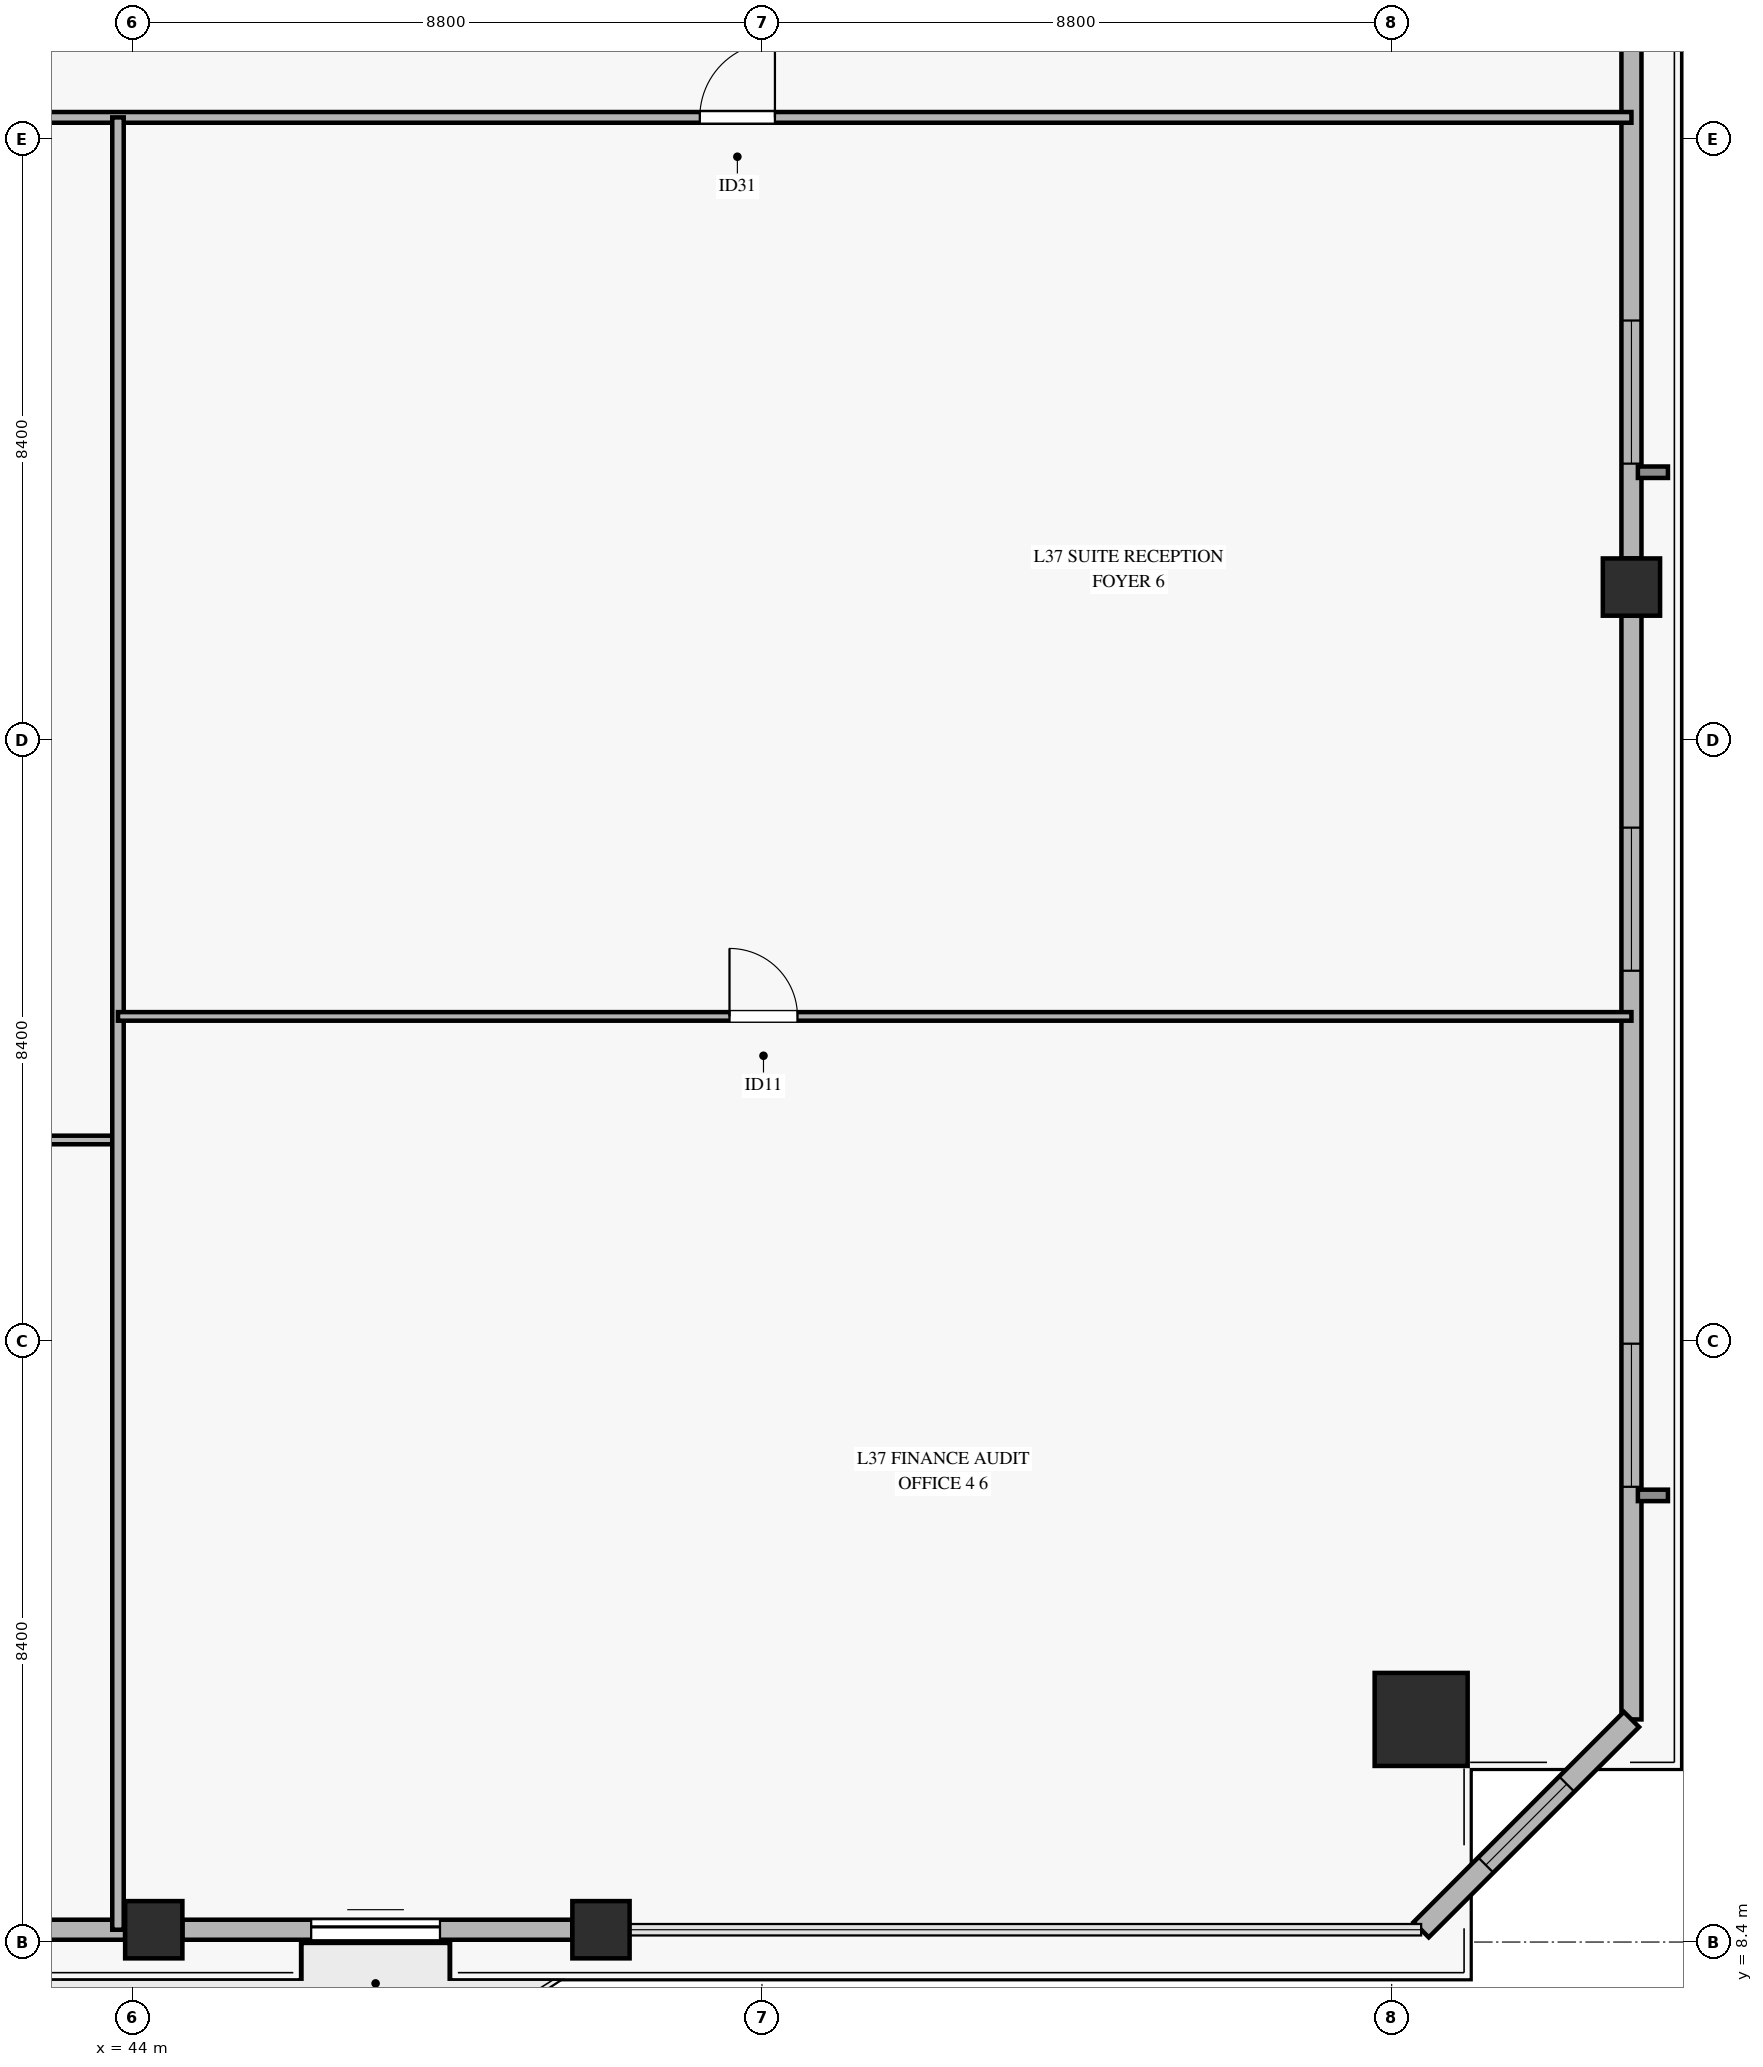
"""IFC4 building model, lengths in metres.
Left out: names, types, materials, properties, quantities, classifications, styles, units other than length and angle.
Written with IfcOpenShell. Run it as: python <this file> out.ifc"""

import sys

from ifc_helpers import new_model, si_unit, direction, frame, frame_2d, origin, origin_2d, place, context, subcontext, project, spatial, rectangle, hollow_rectangle, extrude, source, transform, mapped, element, fill, save


model = new_model("IFC4")
c1 = context("Model", 3, precision=1e-05, world=origin(), true_north=direction((0.0, 1.0)))
c2 = subcontext(c1, "Body", "Model", "MODEL_VIEW")
j1 = project(units=[si_unit("LENGTHUNIT", "METRE"), si_unit("PLANEANGLEUNIT", "RADIAN")], contexts=[c1])
p1 = place(None, origin())
s1 = spatial("IfcSite", under=j1, at=p1, CompositionType="ELEMENT")
p2 = place(p1, origin())
s2 = spatial("IfcBuilding", under=s1, at=p2, CompositionType="ELEMENT")
p3 = place(p2, frame((0.0, 0.0, 152.7)))
s3 = spatial("IfcBuildingStorey", under=s2, at=p3, CompositionType="ELEMENT", Elevation=152.7)
m1 = source(origin(), c2, "Body", "SweptSolid", [
    extrude(hollow_rectangle(XDim=1.3, YDim=1.3, WallThickness=0.06, at=origin_2d()), origin(), (0.0, 0.0, 1.0), 3.27),
])
p4 = place(p3, frame((62.012, 11.511, 0.0), z_axis=(0.0, 0.0, 1.0), x_axis=(1.0, 0.0, 0.0)))
e1 = element("IfcColumn", 1, at=p4, inside=s3, PredefinedType="COLUMN", context=c2, shape_type="MappedRepresentation", body=[
    mapped(m1, transform((0.0, 0.0, 0.0), x_axis=(1.0, 0.0, 0.0), y_axis=(0.0, 1.0, 0.0), z_axis=(0.0, 0.0, 1.0), scale=1.0)),
])
m2 = source(origin(), c2, "Body", "SweptSolid", [
    extrude(hollow_rectangle(XDim=0.8, YDim=0.8, WallThickness=0.036, at=origin_2d()), origin(), (0.0, 0.0, 1.0), 3.27),
])
for number, where, z_axis, x_axis in (
    (2, (44.3, 8.572, 0.0), (0.0, 0.0, 1.0), (1.0, 0.0, 0.0)),
    (3, (50.55, 8.572, 0.0), (0.0, 0.0, 1.0), (1.0, 0.0, 0.0)),
    (4, (64.951, 27.336, 0.0), (0.0, 0.0, 1.0), (1.0, 0.0, 0.0)),
):
    element("IfcColumn", number, at=place(p3, frame(where, z_axis=z_axis, x_axis=x_axis)), inside=s3, PredefinedType="COLUMN", context=c2, shape_type="MappedRepresentation", body=[
        mapped(m2, transform((0.0, 0.0, 0.0), x_axis=(1.0, 0.0, 0.0), y_axis=(0.0, 1.0, 0.0), z_axis=(0.0, 0.0, 1.0), scale=1.0)),
    ])
p5 = place(p3, frame((37.95, 8.572, 0.0), z_axis=(0.0, 0.0, 1.0), x_axis=(1.0, 0.0, 0.0)))
e5 = element("IfcWall", 5, at=p5, inside=s3, PredefinedType="SOLIDWALL", context=c2, shape_type="SweptSolid", body=[
    extrude(rectangle(XDim=5.95, YDim=0.28, at=frame_2d((2.975, 0.0))), origin(), (0.0, 0.0, 1.0), 2.75),
])
p6 = place(p3, frame((44.7, 8.572, 0.0), z_axis=(0.0, 0.0, 1.0), x_axis=(1.0, 0.0, 0.0)))
e6 = element("IfcWall", 6, at=p6, inside=s3, PredefinedType="SOLIDWALL", context=c2, shape_type="SweptSolid", body=[
    extrude(rectangle(XDim=5.45, YDim=0.28, at=frame_2d((2.725, 0.0))), origin(), (0.0, 0.0, 1.0), 2.75),
])
p7 = place(p6, frame((1.8, 0.0, 0.0)))
e7 = element("IfcOpeningElement", 7, at=p7, cuts=e6, PredefinedType="OPENING", context=c2, shape_type="SweptSolid", body=[
    extrude(rectangle(XDim=1.8, YDim=2.25, at=frame_2d((0.9, 1.125))), frame((0.0, 0.15, 0.0), z_axis=(0.0, -1.0, 0.0), x_axis=(1.0, 0.0, 0.0)), (0.0, 0.0, 1.0), 0.3),
])
p8 = place(p3, frame((64.951, 11.511, 0.0), z_axis=(0.0, 0.0, 1.0), x_axis=(0.0, 1.0, 0.0)))
e8 = element("IfcWall", 8, at=p8, inside=s3, PredefinedType="SOLIDWALL", context=c2, shape_type="SweptSolid", body=[
    extrude(rectangle(XDim=15.425, YDim=0.28, at=frame_2d((7.712, 0.0))), origin(), (0.0, 0.0, 1.0), 2.75),
])
p9 = place(p8, frame((3.251, 0.0, 0.45)))
e9 = element("IfcOpeningElement", 9, at=p9, cuts=e8, PredefinedType="OPENING", context=c2, shape_type="SweptSolid", body=[
    extrude(rectangle(XDim=2.0, YDim=2.0, at=frame_2d((1.0, 1.0))), frame((0.0, 0.15, 0.0), z_axis=(0.0, -1.0, 0.0), x_axis=(1.0, 0.0, 0.0)), (0.0, 0.0, 1.0), 0.3),
])
p10 = place(p8, frame((10.463, 0.0, 0.45)))
e10 = element("IfcOpeningElement", 10, at=p10, cuts=e8, PredefinedType="OPENING", context=c2, shape_type="SweptSolid", body=[
    extrude(rectangle(XDim=2.0, YDim=2.0, at=frame_2d((1.0, 1.0))), frame((0.0, 0.15, 0.0), z_axis=(0.0, -1.0, 0.0), x_axis=(1.0, 0.0, 0.0)), (0.0, 0.0, 1.0), 0.3),
])
p11 = place(p3, frame((64.951, 27.736, 0.0), z_axis=(0.0, 0.0, 1.0), x_axis=(0.0, 1.0, 0.0)))
e11 = element("IfcWall", 11, at=p11, inside=s3, PredefinedType="SOLIDWALL", context=c2, shape_type="SweptSolid", body=[
    extrude(rectangle(XDim=15.425, YDim=0.28, at=frame_2d((7.712, 0.0))), origin(), (0.0, 0.0, 1.0), 2.75),
])
p12 = place(p11, frame((1.325, 0.0, 0.45)))
e12 = element("IfcOpeningElement", 12, at=p12, cuts=e11, PredefinedType="OPENING", context=c2, shape_type="SweptSolid", body=[
    extrude(rectangle(XDim=2.0, YDim=2.0, at=frame_2d((1.0, 1.0))), frame((0.0, 0.15, 0.0), z_axis=(0.0, -1.0, 0.0), x_axis=(1.0, 0.0, 0.0)), (0.0, 0.0, 1.0), 0.3),
])
p13 = place(p11, frame((12.031, 0.0, 0.45)))
e13 = element("IfcOpeningElement", 13, at=p13, cuts=e11, PredefinedType="OPENING", context=c2, shape_type="SweptSolid", body=[
    extrude(rectangle(XDim=2.0, YDim=2.0, at=frame_2d((1.0, 1.0))), frame((0.0, 0.15, 0.0), z_axis=(0.0, -1.0, 0.0), x_axis=(1.0, 0.0, 0.0)), (0.0, 0.0, 1.0), 0.3),
])
p14 = place(p3, frame((62.012, 8.572, 0.0), z_axis=(0.0, 0.0, 1.0), x_axis=(0.707106781187, 0.707106781187, 0.0)))
e14 = element("IfcWall", 14, at=p14, inside=s3, PredefinedType="SOLIDWALL", context=c2, shape_type="SweptSolid", body=[
    extrude(rectangle(XDim=4.156, YDim=0.3, at=frame_2d((2.078, 0.0))), origin(), (0.0, 0.0, 1.0), 2.75),
])
p15 = place(p14, frame((1.278, 0.0, 0.45)))
e15 = element("IfcOpeningElement", 15, at=p15, cuts=e14, PredefinedType="OPENING", context=c2, shape_type="SweptSolid", body=[
    extrude(rectangle(XDim=1.6, YDim=2.0, at=frame_2d((0.8, 1.0))), frame((0.0, 0.16, 0.0), z_axis=(0.0, -1.0, 0.0), x_axis=(1.0, 0.0, 0.0)), (0.0, 0.0, 1.0), 0.32),
])
p16 = place(p3, frame((5.449, 33.9, 0.0), z_axis=(0.0, 0.0, 1.0), x_axis=(1.0, 0.0, 0.0)))
e16 = element("IfcWall", 16, at=p16, inside=s3, PredefinedType="PARTITIONING", context=c2, shape_type="SweptSolid", body=[
    extrude(rectangle(XDim=59.502, YDim=0.15, at=frame_2d((29.751, 0.0))), origin(), (0.0, 0.0, 1.0), 2.455),
])
p17 = place(p16, frame((6.355, 0.0, 0.0)))
e17 = element("IfcOpeningElement", 17, at=p17, cuts=e16, PredefinedType="OPENING", context=c2, shape_type="SweptSolid", body=[
    extrude(rectangle(XDim=1.05, YDim=2.15, at=frame_2d((0.525, 1.075))), frame((0.0, 0.085, 0.0), z_axis=(0.0, -1.0, 0.0), x_axis=(1.0, 0.0, 0.0)), (0.0, 0.0, 1.0), 0.17),
])
p18 = place(p16, frame((18.704, 0.0, 0.0)))
e18 = element("IfcOpeningElement", 18, at=p18, cuts=e16, PredefinedType="OPENING", context=c2, shape_type="SweptSolid", body=[
    extrude(rectangle(XDim=1.05, YDim=2.15, at=frame_2d((0.525, 1.075))), frame((0.0, 0.085, 0.0), z_axis=(0.0, -1.0, 0.0), x_axis=(1.0, 0.0, 0.0)), (0.0, 0.0, 1.0), 0.17),
])
p19 = place(p16, frame((24.896, 0.0, 0.0)))
e19 = element("IfcOpeningElement", 19, at=p19, cuts=e16, PredefinedType="OPENING", context=c2, shape_type="SweptSolid", body=[
    extrude(rectangle(XDim=1.05, YDim=2.15, at=frame_2d((0.525, 1.075))), frame((0.0, 0.085, 0.0), z_axis=(0.0, -1.0, 0.0), x_axis=(1.0, 0.0, 0.0)), (0.0, 0.0, 1.0), 0.17),
])
p20 = place(p16, frame((30.387, 0.0, 0.0)))
e20 = element("IfcOpeningElement", 20, at=p20, cuts=e16, PredefinedType="OPENING", context=c2, shape_type="SweptSolid", body=[
    extrude(rectangle(XDim=1.05, YDim=2.15, at=frame_2d((0.525, 1.075))), frame((0.0, 0.085, 0.0), z_axis=(0.0, -1.0, 0.0), x_axis=(1.0, 0.0, 0.0)), (0.0, 0.0, 1.0), 0.17),
])
p21 = place(p16, frame((35.587, 0.0, 0.0)))
e21 = element("IfcOpeningElement", 21, at=p21, cuts=e16, PredefinedType="OPENING", context=c2, shape_type="SweptSolid", body=[
    extrude(rectangle(XDim=1.05, YDim=2.15, at=frame_2d((0.525, 1.075))), frame((0.0, 0.085, 0.0), z_axis=(0.0, -1.0, 0.0), x_axis=(1.0, 0.0, 0.0)), (0.0, 0.0, 1.0), 0.17),
])
p22 = place(p16, frame((46.482, 0.0, 0.0)))
e22 = element("IfcOpeningElement", 22, at=p22, cuts=e16, PredefinedType="OPENING", context=c2, shape_type="SweptSolid", body=[
    extrude(rectangle(XDim=1.05, YDim=2.15, at=frame_2d((0.525, 1.075))), frame((0.0, 0.085, 0.0), z_axis=(0.0, -1.0, 0.0), x_axis=(1.0, 0.0, 0.0)), (0.0, 0.0, 1.0), 0.17),
])
p23 = place(p3, frame((38.6, 19.609, 0.0), z_axis=(0.0, 0.0, 1.0), x_axis=(1.0, 0.0, 0.0)))
e23 = element("IfcWall", 23, at=p23, inside=s3, PredefinedType="PARTITIONING", context=c2, shape_type="SweptSolid", body=[
    extrude(rectangle(XDim=5.2, YDim=0.12, at=frame_2d((2.6, 0.0))), origin(), (0.0, 0.0, 1.0), 3.27),
])
p24 = place(p23, frame((2.325, 0.0, 0.0)))
e24 = element("IfcOpeningElement", 24, at=p24, cuts=e23, PredefinedType="OPENING", context=c2, shape_type="SweptSolid", body=[
    extrude(rectangle(XDim=0.95, YDim=2.1, at=frame_2d((0.475, 1.05))), frame((0.0, 0.07, 0.0), z_axis=(0.0, -1.0, 0.0), x_axis=(1.0, 0.0, 0.0)), (0.0, 0.0, 1.0), 0.14),
])
p25 = place(p3, frame((43.8, 8.572, 0.0), z_axis=(0.0, 0.0, 1.0), x_axis=(0.0, 1.0, 0.0)))
e25 = element("IfcWall", 25, at=p25, inside=s3, PredefinedType="PARTITIONING", context=c2, shape_type="SweptSolid", body=[
    extrude(rectangle(XDim=25.328, YDim=0.16, at=frame_2d((12.664, 0.0))), origin(), (0.0, 0.0, 1.0), 2.755),
])
p26 = place(p3, frame((43.8, 21.336, 0.0), z_axis=(0.0, 0.0, 1.0), x_axis=(1.0, 0.0, 0.0)))
e26 = element("IfcWall", 26, at=p26, inside=s3, PredefinedType="PARTITIONING", context=c2, shape_type="SweptSolid", body=[
    extrude(rectangle(XDim=21.151, YDim=0.12, at=frame_2d((10.575, 0.0))), origin(), (0.0, 0.0, 1.0), 2.455),
])
p27 = place(p26, frame((8.546, 0.0, 0.0)))
e27 = element("IfcOpeningElement", 27, at=p27, cuts=e26, PredefinedType="OPENING", context=c2, shape_type="SweptSolid", body=[
    extrude(rectangle(XDim=0.95, YDim=2.1, at=frame_2d((0.475, 1.05))), frame((0.0, 0.07, 0.0), z_axis=(0.0, -1.0, 0.0), x_axis=(1.0, 0.0, 0.0)), (0.0, 0.0, 1.0), 0.14),
])
m3 = source(origin(), c2, "Body", "SweptSolid", [
    extrude(rectangle(XDim=1.8, YDim=2.25, at=frame_2d((0.9, 1.125))), frame((0.0, 0.025, 0.0), z_axis=(0.0, -1.0, 0.0), x_axis=(1.0, 0.0, 0.0)), (0.0, 0.0, 1.0), 0.05),
])
p28 = place(p7, origin())
e28 = element("IfcDoor", 28, at=p28, inside=s3, OperationType="SLIDING_TO_LEFT", PredefinedType="DOOR", context=c2, shape_type="MappedRepresentation", body=[
    mapped(m3, transform((0.0, 0.0, 0.0), x_axis=(1.0, 0.0, 0.0), y_axis=(0.0, 1.0, 0.0), z_axis=(0.0, 0.0, 1.0), scale=1.0)),
])
fill(e7, e28)
m4 = source(origin(), c2, "Body", "SweptSolid", [
    extrude(rectangle(XDim=2.0, YDim=2.0, at=frame_2d((1.0, 1.0))), frame((0.0, 0.03, 0.0), z_axis=(0.0, -1.0, 0.0), x_axis=(1.0, 0.0, 0.0)), (0.0, 0.0, 1.0), 0.06),
])
p29 = place(p9, origin())
e29 = element("IfcWindow", 29, at=p29, inside=s3, PartitioningType="SINGLE_PANEL", PredefinedType="WINDOW", context=c2, shape_type="MappedRepresentation", body=[
    mapped(m4, transform((0.0, 0.0, 0.0), x_axis=(1.0, 0.0, 0.0), y_axis=(0.0, 1.0, 0.0), z_axis=(0.0, 0.0, 1.0), scale=1.0)),
])
fill(e9, e29)
p30 = place(p10, origin())
e30 = element("IfcWindow", 30, at=p30, inside=s3, PartitioningType="SINGLE_PANEL", PredefinedType="WINDOW", context=c2, shape_type="MappedRepresentation", body=[
    mapped(m4, transform((0.0, 0.0, 0.0), x_axis=(1.0, 0.0, 0.0), y_axis=(0.0, 1.0, 0.0), z_axis=(0.0, 0.0, 1.0), scale=1.0)),
])
fill(e10, e30)
p31 = place(p12, origin())
e31 = element("IfcWindow", 31, at=p31, inside=s3, PartitioningType="SINGLE_PANEL", PredefinedType="WINDOW", context=c2, shape_type="MappedRepresentation", body=[
    mapped(m4, transform((0.0, 0.0, 0.0), x_axis=(1.0, 0.0, 0.0), y_axis=(0.0, 1.0, 0.0), z_axis=(0.0, 0.0, 1.0), scale=1.0)),
])
fill(e12, e31)
m5 = source(origin(), c2, "Body", "SweptSolid", [
    extrude(rectangle(XDim=1.6, YDim=2.0, at=frame_2d((0.8, 1.0))), frame((0.0, 0.03, 0.0), z_axis=(0.0, -1.0, 0.0), x_axis=(1.0, 0.0, 0.0)), (0.0, 0.0, 1.0), 0.06),
])
p32 = place(p15, origin())
e32 = element("IfcWindow", 32, at=p32, inside=s3, PartitioningType="SINGLE_PANEL", PredefinedType="WINDOW", context=c2, shape_type="MappedRepresentation", body=[
    mapped(m5, transform((0.0, 0.0, 0.0), x_axis=(1.0, 0.0, 0.0), y_axis=(0.0, 1.0, 0.0), z_axis=(0.0, 0.0, 1.0), scale=1.0)),
])
fill(e15, e32)
m6 = source(origin(), c2, "Body", "SweptSolid", [
    extrude(rectangle(XDim=1.05, YDim=2.15, at=frame_2d((0.525, 1.075))), frame((0.0, 0.025, 0.0), z_axis=(0.0, -1.0, 0.0), x_axis=(1.0, 0.0, 0.0)), (0.0, 0.0, 1.0), 0.05),
])
p33 = place(p22, origin())
e33 = element("IfcDoor", 33, at=p33, inside=s3, OperationType="SINGLE_SWING_RIGHT", PredefinedType="DOOR", context=c2, shape_type="MappedRepresentation", body=[
    mapped(m6, transform((0.0, 0.0, 0.0), x_axis=(1.0, 0.0, 0.0), y_axis=(0.0, 1.0, 0.0), z_axis=(0.0, 0.0, 1.0), scale=1.0)),
])
fill(e22, e33)
m7 = source(origin(), c2, "Body", "SweptSolid", [
    extrude(rectangle(XDim=0.95, YDim=2.1, at=frame_2d((0.475, 1.05))), frame((0.0, 0.025, 0.0), z_axis=(0.0, -1.0, 0.0), x_axis=(1.0, 0.0, 0.0)), (0.0, 0.0, 1.0), 0.05),
])
p34 = place(p27, origin())
e34 = element("IfcDoor", 34, at=p34, inside=s3, OperationType="SINGLE_SWING_LEFT", PredefinedType="DOOR", context=c2, shape_type="MappedRepresentation", body=[
    mapped(m7, transform((0.0, 0.0, 0.0), x_axis=(1.0, 0.0, 0.0), y_axis=(0.0, 1.0, 0.0), z_axis=(0.0, 0.0, 1.0), scale=1.0)),
])
fill(e27, e34)
save(model, sys.argv[1])
